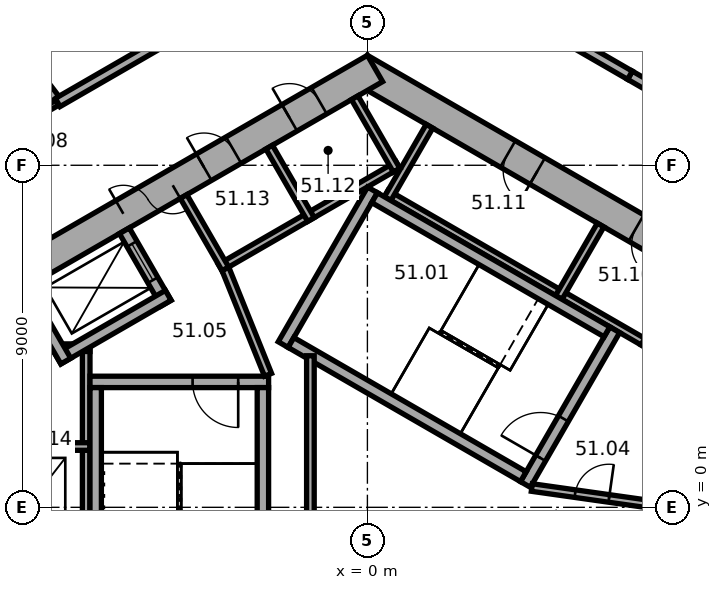
"""IFC4 building model, lengths in metres.
Left out: names, types, materials, properties, quantities, classifications, styles, units other than length and angle.
Written with IfcOpenShell. Run it as: python <this file> out.ifc"""

import sys

from ifc_helpers import new_model, si_unit, direction, frame, frame_2d, origin, place, context, subcontext, project, spatial, rectangle, extrude, element, fill, save


model = new_model("IFC4")
c1 = context("Model", 3, precision=1e-05, world=origin(), true_north=direction((0.0, 1.0)))
c2 = subcontext(c1, "Body", "Model", "MODEL_VIEW")
j1 = project(units=[si_unit("LENGTHUNIT", "METRE"), si_unit("PLANEANGLEUNIT", "RADIAN")], contexts=[c1])
p1 = place(None, origin())
s1 = spatial("IfcSite", under=j1, at=p1, CompositionType="ELEMENT")
p2 = place(p1, origin())
s2 = spatial("IfcBuilding", under=s1, at=p2, CompositionType="ELEMENT")
p3 = place(p2, frame((0.0, 0.0, 205.8)))
s3 = spatial("IfcBuildingStorey", under=s2, at=p3, CompositionType="ELEMENT", Elevation=205.8)
p4 = place(p3, frame((10.1, 5.6, 0.0), z_axis=(0.0, 0.0, 1.0), x_axis=(-0.866023897231, 0.500002609418, 0.0)))
e1 = element("IfcWall", 1, at=p4, inside=s3, PredefinedType="SHEAR", context=c2, shape_type="SweptSolid", body=[
    extrude(rectangle(XDim=11.894, YDim=0.8, at=frame_2d((5.947, 0.0))), origin(), (0.0, 0.0, 1.0), 4.8),
])
p5 = place(p4, frame((2.597, 0.0, 0.0)))
e2 = element("IfcOpeningElement", 2, at=p5, cuts=e1, PredefinedType="OPENING", context=c2, shape_type="SweptSolid", body=[
    extrude(rectangle(XDim=0.9, YDim=2.1, at=frame_2d((0.45, 1.05))), frame((0.0, 0.41, 0.0), z_axis=(0.0, -1.0, 0.0), x_axis=(1.0, 0.0, 0.0)), (0.0, 0.0, 1.0), 0.82),
])
p6 = place(p4, frame((6.497, 0.0, 0.0)))
e3 = element("IfcOpeningElement", 3, at=p6, cuts=e1, PredefinedType="OPENING", context=c2, shape_type="SweptSolid", body=[
    extrude(rectangle(XDim=0.9, YDim=2.1, at=frame_2d((0.45, 1.05))), frame((0.0, 0.41, 0.0), z_axis=(0.0, -1.0, 0.0), x_axis=(1.0, 0.0, 0.0)), (0.0, 0.0, 1.0), 0.82),
])
p7 = place(p3, frame((0.2, 11.547, 0.0), z_axis=(0.0, 0.0, 1.0), x_axis=(-0.866023897231, -0.500002609418, 0.0)))
e4 = element("IfcWall", 4, at=p7, inside=s3, PredefinedType="SHEAR", context=c2, shape_type="SweptSolid", body=[
    extrude(rectangle(XDim=11.894, YDim=0.8, at=frame_2d((5.947, 0.0))), origin(), (0.0, 0.0, 1.0), 4.8),
])
p8 = place(p7, frame((6.147, 0.0, 0.0)))
e5 = element("IfcOpeningElement", 5, at=p8, cuts=e4, PredefinedType="OPENING", context=c2, shape_type="SweptSolid", body=[
    extrude(rectangle(XDim=1.5, YDim=2.1, at=frame_2d((0.75, 1.05))), frame((0.0, 0.41, 0.0), z_axis=(0.0, -1.0, 0.0), x_axis=(1.0, 0.0, 0.0)), (0.0, 0.0, 1.0), 0.82),
])
p9 = place(p7, frame((1.697, 0.0, 0.0)))
e6 = element("IfcOpeningElement", 6, at=p9, cuts=e4, PredefinedType="OPENING", context=c2, shape_type="SweptSolid", body=[
    extrude(rectangle(XDim=0.9, YDim=2.1, at=frame_2d((0.45, 1.05))), frame((0.0, 0.41, 0.0), z_axis=(0.0, -1.0, 0.0), x_axis=(1.0, 0.0, 0.0)), (0.0, 0.0, 1.0), 0.82),
])
p10 = place(p7, frame((4.297, 0.0, 0.0)))
e7 = element("IfcOpeningElement", 7, at=p10, cuts=e4, PredefinedType="OPENING", context=c2, shape_type="SweptSolid", body=[
    extrude(rectangle(XDim=0.9, YDim=2.1, at=frame_2d((0.45, 1.05))), frame((0.0, 0.41, 0.0), z_axis=(0.0, -1.0, 0.0), x_axis=(1.0, 0.0, 0.0)), (0.0, 0.0, 1.0), 0.82),
])
p11 = place(p3, frame((7.424, 4.259, 0.0), z_axis=(0.0, 0.0, 1.0), x_axis=(-0.866026010844, 0.49999894854, 0.0)))
e8 = element("IfcWall", 8, at=p11, inside=s3, PredefinedType="PARTITIONING", context=c2, shape_type="SweptSolid", body=[
    extrude(rectangle(XDim=8.0, YDim=0.2, at=frame_2d((4.0, 0.0))), origin(), (0.0, 0.0, 1.0), 4.52),
])
for number, where, z_axis, x_axis in (
    (9, (7.287, 4.222, 0.0), (0.0, 0.0, 1.0), (0.5, 0.866, 0.0)),
    (10, (5.036, 5.522, 0.0), (0.0, 0.0, 1.0), (0.5, 0.866, 0.0)),
    (11, (0.532, 8.122, 0.0), (0.0, 0.0, 1.0), (0.5, 0.866, 0.0)),
):
    element("IfcWall", number, at=place(p3, frame(where, z_axis=z_axis, x_axis=x_axis)), inside=s3, PredefinedType="PARTITIONING", context=c2, shape_type="SweptSolid", body=[
        extrude(rectangle(XDim=2.2, YDim=0.2, at=frame_2d((1.1, 0.0))), origin(), (0.0, 0.0, 1.0), 4.52),
    ])
p12 = place(p3, frame((0.803, 9.009, 0.0), z_axis=(0.0, 0.0, 1.0), x_axis=(-0.866028230842, -0.499995103361, 0.0)))
e12 = element("IfcWall", 12, at=p12, inside=s3, PredefinedType="PARTITIONING", context=c2, shape_type="SweptSolid", body=[
    extrude(rectangle(XDim=5.4, YDim=0.2, at=frame_2d((2.7, 0.0))), origin(), (0.0, 0.0, 1.0), 4.52),
])
p13 = place(p3, frame((0.767, 8.872, 0.0), z_axis=(0.0, 0.0, 1.0), x_axis=(-0.499994660107, 0.866028486751, 0.0)))
e13 = element("IfcWall", 13, at=p13, inside=s3, PredefinedType="PARTITIONING", context=c2, shape_type="SweptSolid", body=[
    extrude(rectangle(XDim=2.2, YDim=0.2, at=frame_2d((1.1, 0.0))), origin(), (0.0, 0.0, 1.0), 4.52),
])
for number, where, z_axis, x_axis in (
    (14, (-1.485, 7.572, 0.0), (0.0, 0.0, 1.0), (-0.5, 0.866, 0.0)),
    (15, (-3.737, 6.272, 0.0), (0.0, 0.0, 1.0), (-0.5, 0.866, 0.0)),
):
    element("IfcWall", number, at=place(p3, frame(where, z_axis=z_axis, x_axis=x_axis)), inside=s3, PredefinedType="PARTITIONING", context=c2, shape_type="SweptSolid", body=[
        extrude(rectangle(XDim=2.2, YDim=0.2, at=frame_2d((1.1, 0.0))), origin(), (0.0, 0.0, 1.0), 4.52),
    ])
p14 = place(p3, frame((-7.4, 4.3, 0.0), z_axis=(0.0, 0.0, 1.0), x_axis=(0.0, -1.0, 0.0)))
e16 = element("IfcWall", 16, at=p14, inside=s3, PredefinedType="PARTITIONING", context=c2, shape_type="SweptSolid", body=[
    extrude(rectangle(XDim=8.0, YDim=0.2, at=frame_2d((4.0, 0.0))), origin(), (0.0, 0.0, 1.0), 4.52),
])
for number, where, z_axis, x_axis in (
    (17, (-7.3, 4.2, 0.0), (0.0, 0.0, 1.0), (-1.0, 0.0, 0.0)),
    (18, (-7.3, 1.6, 0.0), (0.0, 0.0, 1.0), (-1.0, 0.0, 0.0)),
):
    element("IfcWall", number, at=place(p3, frame(where, z_axis=z_axis, x_axis=x_axis)), inside=s3, PredefinedType="PARTITIONING", context=c2, shape_type="SweptSolid", body=[
        extrude(rectangle(XDim=2.2, YDim=0.2, at=frame_2d((1.1, 0.0))), origin(), (0.0, 0.0, 1.0), 4.52),
    ])
p15 = place(p3, frame((4.158, 0.602, 0.0), z_axis=(0.0, 0.0, 1.0), x_axis=(0.499977259774, 0.866038532462, 0.0)))
e19 = element("IfcWall", 19, at=p15, inside=s3, PredefinedType="SHEAR", context=c2, shape_type="SweptSolid", body=[
    extrude(rectangle(XDim=4.7, YDim=0.3, at=frame_2d((2.35, 0.0))), origin(), (0.0, 0.0, 1.0), 4.52),
])
p16 = place(p15, frame((0.8, 0.0, 0.0)))
e20 = element("IfcOpeningElement", 20, at=p16, cuts=e19, PredefinedType="OPENING", context=c2, shape_type="SweptSolid", body=[
    extrude(rectangle(XDim=1.2, YDim=2.1, at=frame_2d((0.6, 1.05))), frame((0.0, 0.16, 0.0), z_axis=(0.0, -1.0, 0.0), x_axis=(1.0, 0.0, 0.0)), (0.0, 0.0, 1.0), 0.32),
])
p17 = place(p3, frame((-2.216, 4.282, 0.0), z_axis=(0.0, 0.0, 1.0), x_axis=(0.499977259774, 0.866038532462, 0.0)))
e21 = element("IfcWall", 21, at=p17, inside=s3, PredefinedType="SHEAR", context=c2, shape_type="SweptSolid", body=[
    extrude(rectangle(XDim=4.7, YDim=0.3, at=frame_2d((2.35, 0.0))), origin(), (0.0, 0.0, 1.0), 4.52),
])
for number, where, z_axis, x_axis in (
    (22, (4.103, 0.807, 0.0), (0.0, 0.0, 1.0), (-0.866, 0.5, 0.0)),
    (23, (6.303, 4.617, 0.0), (0.0, 0.0, 1.0), (-0.866, 0.5, 0.0)),
):
    element("IfcWall", number, at=place(p3, frame(where, z_axis=z_axis, x_axis=x_axis)), inside=s3, PredefinedType="SHEAR", context=c2, shape_type="SweptSolid", body=[
        extrude(rectangle(XDim=7.06, YDim=0.3, at=frame_2d((3.53, 0.0))), origin(), (0.0, 0.0, 1.0), 4.52),
    ])
p18 = place(p3, frame((-2.6, 3.3, 0.0), z_axis=(0.0, 0.0, 1.0), x_axis=(-1.0, 0.0, 0.0)))
e24 = element("IfcWall", 24, at=p18, inside=s3, PredefinedType="SHEAR", context=c2, shape_type="SweptSolid", body=[
    extrude(rectangle(XDim=4.7, YDim=0.3, at=frame_2d((2.35, 0.0))), origin(), (0.0, 0.0, 1.0), 4.52),
])
p19 = place(p18, frame((0.8, 0.0, 0.0)))
e25 = element("IfcOpeningElement", 25, at=p19, cuts=e24, PredefinedType="OPENING", context=c2, shape_type="SweptSolid", body=[
    extrude(rectangle(XDim=1.2, YDim=2.1, at=frame_2d((0.6, 1.05))), frame((0.0, 0.16, 0.0), z_axis=(0.0, -1.0, 0.0), x_axis=(1.0, 0.0, 0.0)), (0.0, 0.0, 1.0), 0.32),
])
for number, where, z_axis, x_axis in (
    (26, (-2.75, 3.15, 0.0), (0.0, 0.0, 1.0), (0.0, -1.0, 0.0)),
    (27, (-7.15, 3.15, 0.0), (0.0, 0.0, 1.0), (0.0, -1.0, 0.0)),
):
    element("IfcWall", number, at=place(p3, frame(where, z_axis=z_axis, x_axis=x_axis)), inside=s3, PredefinedType="SHEAR", context=c2, shape_type="SweptSolid", body=[
        extrude(rectangle(XDim=7.06, YDim=0.3, at=frame_2d((3.53, 0.0))), origin(), (0.0, 0.0, 1.0), 4.52),
    ])
p20 = place(p3, frame((4.327, 0.521, 0.0), z_axis=(0.0, 0.0, 1.0), x_axis=(0.990124376366, -0.14019172346, 0.0)))
e28 = element("IfcWall", 28, at=p20, inside=s3, PredefinedType="PARTITIONING", context=c2, shape_type="SweptSolid", body=[
    extrude(rectangle(XDim=3.002, YDim=0.2, at=frame_2d((1.501, 0.0))), origin(), (0.0, 0.0, 1.0), 4.52),
])
p21 = place(p20, frame((1.15, 0.0, 0.0)))
e29 = element("IfcOpeningElement", 29, at=p21, cuts=e28, PredefinedType="OPENING", context=c2, shape_type="SweptSolid", body=[
    extrude(rectangle(XDim=0.9, YDim=2.1, at=frame_2d((0.45, 1.05))), frame((0.0, 0.11, 0.0), z_axis=(0.0, -1.0, 0.0), x_axis=(1.0, 0.0, 0.0)), (0.0, 0.0, 1.0), 0.22),
])
p22 = place(p3, frame((-5.295, 5.372, 0.0), z_axis=(0.0, 0.0, 1.0), x_axis=(-0.500077893725, 0.86598042715, 0.0)))
e30 = element("IfcWall", 30, at=p22, inside=s3, PredefinedType="SHEAR", context=c2, shape_type="SweptSolid", body=[
    extrude(rectangle(XDim=2.2, YDim=0.3, at=frame_2d((1.1, 0.0))), origin(), (0.0, 0.0, 1.0), 4.52),
])
p23 = place(p22, frame((0.7, 0.0, 0.0)))
e31 = element("IfcOpeningElement", 31, at=p23, cuts=e30, PredefinedType="OPENING", context=c2, shape_type="SweptSolid", body=[
    extrude(rectangle(XDim=1.1, YDim=2.1, at=frame_2d((0.55, 1.05))), frame((0.0, 0.16, 0.0), z_axis=(0.0, -1.0, 0.0), x_axis=(1.0, 0.0, 0.0)), (0.0, 0.0, 1.0), 0.32),
])
p24 = place(p3, frame((-5.24, 5.577, 0.0), z_axis=(0.0, 0.0, 1.0), x_axis=(-0.866014461049, -0.500018952895, 0.0)))
e32 = element("IfcWall", 32, at=p24, inside=s3, PredefinedType="SHEAR", context=c2, shape_type="SweptSolid", body=[
    extrude(rectangle(XDim=3.35, YDim=0.3, at=frame_2d((1.675, 0.0))), origin(), (0.0, 0.0, 1.0), 4.52),
])
p25 = place(p3, frame((-7.937, 3.847, 0.0), z_axis=(0.0, 0.0, 1.0), x_axis=(-0.50002983664, 0.866008176907, 0.0)))
e33 = element("IfcWall", 33, at=p25, inside=s3, PredefinedType="SHEAR", context=c2, shape_type="SweptSolid", body=[
    extrude(rectangle(XDim=2.2, YDim=0.3, at=frame_2d((1.1, 0.0))), origin(), (0.0, 0.0, 1.0), 4.52),
])
p26 = place(p3, frame((-2.615, 3.487, 0.0), z_axis=(0.0, 0.0, 1.0), x_axis=(-0.373576831041, 0.92759924068, 0.0)))
e34 = element("IfcWall", 34, at=p26, inside=s3, PredefinedType="PARTITIONING", context=c2, shape_type="SweptSolid", body=[
    extrude(rectangle(XDim=3.002, YDim=0.2, at=frame_2d((1.501, 0.0))), origin(), (0.0, 0.0, 1.0), 4.52),
])
p27 = place(p3, frame((-1.5, -3.988, 0.0), z_axis=(0.0, 0.0, 1.0), x_axis=(0.0, 1.0, 0.0)))
e35 = element("IfcWall", 35, at=p27, inside=s3, PredefinedType="PARTITIONING", context=c2, shape_type="SweptSolid", body=[
    extrude(rectangle(XDim=7.977, YDim=0.2, at=frame_2d((3.988, 0.0))), origin(), (0.0, 0.0, 1.0), 4.52),
])
p28 = place(p3, frame((11.385, 8.784, 0.0), z_axis=(0.0, 0.0, 1.0), x_axis=(-0.866019619451, 0.500010018626, 0.0)))
e36 = element("IfcWall", 36, at=p28, inside=s3, PredefinedType="SOLIDWALL", context=c2, shape_type="SweptSolid", body=[
    extrude(rectangle(XDim=5.169, YDim=0.25, at=frame_2d((2.584, 0.0))), origin(), (0.0, 0.0, 1.0), 4.52),
])
p29 = place(p28, frame((0.25, 0.0, 0.0)))
e37 = element("IfcOpeningElement", 37, at=p29, cuts=e36, PredefinedType="OPENING", context=c2, shape_type="SweptSolid", body=[
    extrude(rectangle(XDim=1.4, YDim=2.1, at=frame_2d((0.7, 1.05))), frame((0.0, 0.135, 0.0), z_axis=(0.0, -1.0, 0.0), x_axis=(1.0, 0.0, 0.0)), (0.0, 0.0, 1.0), 0.27),
])
p30 = place(p3, frame((-8.15, 10.652, 0.0), z_axis=(0.0, 0.0, 1.0), x_axis=(-0.866047461757, -0.499961792524, 0.0)))
e38 = element("IfcWall", 38, at=p30, inside=s3, PredefinedType="PARTITIONING", context=c2, shape_type="SweptSolid", body=[
    extrude(rectangle(XDim=5.887, YDim=0.15, at=frame_2d((2.943, 0.0))), origin(), (0.0, 0.0, 1.0), 4.52),
])
p31 = place(p30, frame((0.65, 0.0, 0.0)))
e39 = element("IfcOpeningElement", 39, at=p31, cuts=e38, PredefinedType="OPENING", context=c2, shape_type="SweptSolid", body=[
    extrude(rectangle(XDim=1.0, YDim=2.1, at=frame_2d((0.5, 1.05))), frame((0.0, 0.085, 0.0), z_axis=(0.0, -1.0, 0.0), x_axis=(1.0, 0.0, 0.0)), (0.0, 0.0, 1.0), 0.17),
])
p32 = place(p3, frame((-8.15, 10.652, 0.0), z_axis=(0.0, 0.0, 1.0), x_axis=(0.866033669941, 0.499985682323, 0.0)))
e40 = element("IfcWall", 40, at=p32, inside=s3, PredefinedType="SOLIDWALL", context=c2, shape_type="SweptSolid", body=[
    extrude(rectangle(XDim=7.065, YDim=0.25, at=frame_2d((3.533, 0.0))), origin(), (0.0, 0.0, 1.0), 4.52),
])
p33 = place(p32, frame((5.415, 0.0, 0.0)))
e41 = element("IfcOpeningElement", 41, at=p33, cuts=e40, PredefinedType="OPENING", context=c2, shape_type="SweptSolid", body=[
    extrude(rectangle(XDim=1.4, YDim=2.1, at=frame_2d((0.7, 1.05))), frame((0.0, 0.135, 0.0), z_axis=(0.0, -1.0, 0.0), x_axis=(1.0, 0.0, 0.0)), (0.0, 0.0, 1.0), 0.27),
])
p34 = place(p3, frame((6.909, 11.369, 0.0), z_axis=(0.0, 0.0, 1.0), x_axis=(-0.86600557522, 0.500034342508, 0.0)))
e42 = element("IfcWall", 42, at=p34, inside=s3, PredefinedType="SOLIDWALL", context=c2, shape_type="SweptSolid", body=[
    extrude(rectangle(XDim=1.739, YDim=0.25, at=frame_2d((0.87, 0.0))), origin(), (0.0, 0.0, 1.0), 4.52),
])
p35 = place(p3, frame((-10.283, 13.44, 0.0), z_axis=(0.0, 0.0, 1.0), x_axis=(0.607714696744, -0.794155430228, 0.0)))
e43 = element("IfcWall", 43, at=p35, inside=s3, PredefinedType="SOLIDWALL", context=c2, shape_type="SweptSolid", body=[
    extrude(rectangle(XDim=3.39, YDim=0.25, at=frame_2d((1.695, 0.0))), origin(), (0.0, 0.0, 1.0), 3.6),
])
p36 = place(p3, frame((7.271, 16.471, 0.0), z_axis=(0.0, 0.0, 1.0), x_axis=(0.866053086045, -0.499952049853, 0.0)))
e44 = element("IfcWall", 44, at=p36, inside=s3, PredefinedType="SOLIDWALL", context=c2, shape_type="SweptSolid", body=[
    extrude(rectangle(XDim=9.297, YDim=0.25, at=frame_2d((4.648, 0.0))), origin(), (0.0, 0.0, 1.0), 4.52),
])
p37 = place(p8, origin())
e45 = element("IfcDoor", 45, at=p37, inside=s3, OperationType="DOUBLE_DOOR_SINGLE_SWING", PredefinedType="DOOR", context=c2, shape_type="SweptSolid", body=[
    extrude(rectangle(XDim=1.5, YDim=2.1, at=frame_2d((0.75, 1.05))), frame((0.0, 0.025, 0.0), z_axis=(0.0, -1.0, 0.0), x_axis=(1.0, 0.0, 0.0)), (0.0, 0.0, 1.0), 0.05),
])
fill(e5, e45)
p38 = place(p16, origin())
e46 = element("IfcDoor", 46, at=p38, inside=s3, OperationType="SINGLE_SWING_RIGHT", PredefinedType="DOOR", context=c2, shape_type="SweptSolid", body=[
    extrude(rectangle(XDim=1.2, YDim=2.1, at=frame_2d((0.6, 1.05))), frame((0.0, 0.025, 0.0), z_axis=(0.0, -1.0, 0.0), x_axis=(1.0, 0.0, 0.0)), (0.0, 0.0, 1.0), 0.05),
])
fill(e20, e46)
p39 = place(p19, origin())
e47 = element("IfcDoor", 47, at=p39, inside=s3, OperationType="SINGLE_SWING_RIGHT", PredefinedType="DOOR", context=c2, shape_type="SweptSolid", body=[
    extrude(rectangle(XDim=1.2, YDim=2.1, at=frame_2d((0.6, 1.05))), frame((0.0, 0.025, 0.0), z_axis=(0.0, -1.0, 0.0), x_axis=(1.0, 0.0, 0.0)), (0.0, 0.0, 1.0), 0.05),
])
fill(e25, e47)
p40 = place(p21, origin())
e48 = element("IfcDoor", 48, at=p40, inside=s3, OperationType="SINGLE_SWING_LEFT", PredefinedType="DOOR", context=c2, shape_type="SweptSolid", body=[
    extrude(rectangle(XDim=0.9, YDim=2.1, at=frame_2d((0.45, 1.05))), frame((0.0, 0.025, 0.0), z_axis=(0.0, -1.0, 0.0), x_axis=(1.0, 0.0, 0.0)), (0.0, 0.0, 1.0), 0.05),
])
fill(e29, e48)
p41 = place(p5, origin())
e49 = element("IfcDoor", 49, at=p41, inside=s3, OperationType="SINGLE_SWING_LEFT", PredefinedType="DOOR", context=c2, shape_type="SweptSolid", body=[
    extrude(rectangle(XDim=0.9, YDim=2.1, at=frame_2d((0.45, 1.05))), frame((0.0, 0.025, 0.0), z_axis=(0.0, -1.0, 0.0), x_axis=(1.0, 0.0, 0.0)), (0.0, 0.0, 1.0), 0.05),
])
fill(e2, e49)
p42 = place(p6, origin())
e50 = element("IfcDoor", 50, at=p42, inside=s3, OperationType="SINGLE_SWING_LEFT", PredefinedType="DOOR", context=c2, shape_type="SweptSolid", body=[
    extrude(rectangle(XDim=0.9, YDim=2.1, at=frame_2d((0.45, 1.05))), frame((0.0, 0.025, 0.0), z_axis=(0.0, -1.0, 0.0), x_axis=(1.0, 0.0, 0.0)), (0.0, 0.0, 1.0), 0.05),
])
fill(e3, e50)
p43 = place(p9, origin())
e51 = element("IfcDoor", 51, at=p43, inside=s3, OperationType="SINGLE_SWING_LEFT", PredefinedType="DOOR", context=c2, shape_type="SweptSolid", body=[
    extrude(rectangle(XDim=0.9, YDim=2.1, at=frame_2d((0.45, 1.05))), frame((0.0, 0.025, 0.0), z_axis=(0.0, -1.0, 0.0), x_axis=(1.0, 0.0, 0.0)), (0.0, 0.0, 1.0), 0.05),
])
fill(e6, e51)
p44 = place(p10, origin())
e52 = element("IfcDoor", 52, at=p44, inside=s3, OperationType="SINGLE_SWING_LEFT", PredefinedType="DOOR", context=c2, shape_type="SweptSolid", body=[
    extrude(rectangle(XDim=0.9, YDim=2.1, at=frame_2d((0.45, 1.05))), frame((0.0, 0.025, 0.0), z_axis=(0.0, -1.0, 0.0), x_axis=(1.0, 0.0, 0.0)), (0.0, 0.0, 1.0), 0.05),
])
fill(e7, e52)
p45 = place(p23, origin())
e53 = element("IfcDoor", 53, at=p45, inside=s3, OperationType="DOUBLE_DOOR_SLIDING", PredefinedType="DOOR", context=c2, shape_type="SweptSolid", body=[
    extrude(rectangle(XDim=1.1, YDim=2.1, at=frame_2d((0.55, 1.05))), frame((0.0, 0.025, 0.0), z_axis=(0.0, -1.0, 0.0), x_axis=(1.0, 0.0, 0.0)), (0.0, 0.0, 1.0), 0.05),
])
fill(e31, e53)
save(model, sys.argv[1])
